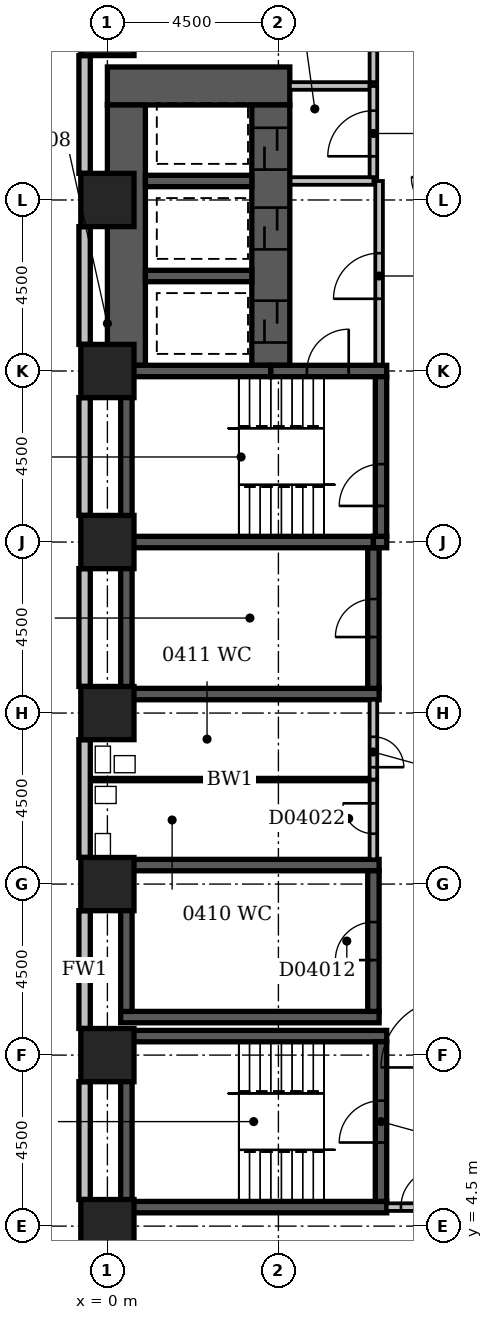
"""IFC4 building model, lengths in metres.
Left out: names, types, materials, properties, quantities, classifications, styles, units other than length and angle.
Written with IfcOpenShell. Run it as: python <this file> out.ifc"""

import sys

from ifc_helpers import new_model, si_unit, direction, frame, frame_2d, origin, origin_2d, place, context, subcontext, project, spatial, rectangle, extrude, element, fill, save


model = new_model("IFC4")
c1 = context("Model", 3, precision=1e-05, world=origin(), true_north=direction((0.0, 1.0)))
c2 = subcontext(c1, "Body", "Model", "MODEL_VIEW")
j1 = project(units=[si_unit("LENGTHUNIT", "METRE"), si_unit("PLANEANGLEUNIT", "RADIAN")], contexts=[c1])
p1 = place(None, origin())
s1 = spatial("IfcSite", under=j1, at=p1, CompositionType="ELEMENT")
p2 = place(p1, origin())
s2 = spatial("IfcBuilding", under=s1, at=p2, CompositionType="ELEMENT")
p3 = place(p2, frame((0.0, 0.0, 24.0)))
s3 = spatial("IfcBuildingStorey", under=s2, at=p3, CompositionType="ELEMENT", Elevation=24.0)
p4 = place(p3, frame((0.0, 34.5, -0.45), z_axis=(0.0, 0.0, 1.0), x_axis=(1.0, 0.0, 0.0)))
e1 = element("IfcWall", 1, at=p4, inside=s3, PredefinedType="SHEAR", context=c2, shape_type="SweptSolid", body=[
    extrude(rectangle(XDim=4.8, YDim=1.0, at=frame_2d((2.4, 0.0))), origin(), (0.0, 0.0, 1.0), 5.15),
])
for number, where, z_axis, x_axis in (
    (2, (0.35, 5.0, -0.45), (0.0, 0.0, 1.0), (1.0, 0.0, 0.0)),
    (3, (0.35, 9.5, -0.45), (0.0, 0.0, 1.0), (1.0, 0.0, 0.0)),
):
    element("IfcWall", number, at=place(p3, frame(where, z_axis=z_axis, x_axis=x_axis)), inside=s3, PredefinedType="SHEAR", context=c2, shape_type="SweptSolid", body=[
        extrude(rectangle(XDim=7.0, YDim=0.3, at=frame_2d((3.5, 0.0))), origin(), (0.0, 0.0, 1.0), 5.15),
    ])
for number, where, z_axis, x_axis in (
    (4, (0.35, 10.0, -0.45), (0.0, 0.0, 1.0), (1.0, 0.0, 0.0)),
    (5, (0.35, 14.0, -0.45), (0.0, 0.0, 1.0), (1.0, 0.0, 0.0)),
    (6, (0.35, 18.5, -0.45), (0.0, 0.0, 1.0), (1.0, 0.0, 0.0)),
):
    element("IfcWall", number, at=place(p3, frame(where, z_axis=z_axis, x_axis=x_axis)), inside=s3, PredefinedType="SHEAR", context=c2, shape_type="SweptSolid", body=[
        extrude(rectangle(XDim=6.8, YDim=0.3, at=frame_2d((3.4, 0.0))), origin(), (0.0, 0.0, 1.0), 5.15),
    ])
p5 = place(p3, frame((0.35, 22.5, -0.45), z_axis=(0.0, 0.0, 1.0), x_axis=(1.0, 0.0, 0.0)))
e7 = element("IfcWall", 7, at=p5, inside=s3, PredefinedType="SHEAR", context=c2, shape_type="SweptSolid", body=[
    extrude(rectangle(XDim=6.65, YDim=0.3, at=frame_2d((3.325, 0.0))), origin(), (0.0, 0.0, 1.0), 5.15),
])
p6 = place(p3, frame((0.35, 27.0, -0.45), z_axis=(0.0, 0.0, 1.0), x_axis=(1.0, 0.0, 0.0)))
e8 = element("IfcWall", 8, at=p6, inside=s3, PredefinedType="SHEAR", context=c2, shape_type="SweptSolid", body=[
    extrude(rectangle(XDim=3.95, YDim=0.3, at=frame_2d((1.975, 0.0))), origin(), (0.0, 0.0, 1.0), 5.15),
])
p7 = place(p3, frame((0.5, 5.15, -0.45), z_axis=(0.0, 0.0, 1.0), x_axis=(0.0, 1.0, 0.0)))
e9 = element("IfcWall", 9, at=p7, inside=s3, PredefinedType="SHEAR", context=c2, shape_type="SweptSolid", body=[
    extrude(rectangle(XDim=4.2, YDim=0.3, at=frame_2d((2.1, 0.0))), origin(), (0.0, 0.0, 1.0), 5.15),
])
for number, where, z_axis, x_axis in (
    (10, (0.5, 10.15, -0.45), (0.0, 0.0, 1.0), (0.0, 1.0, 0.0)),
    (11, (0.5, 18.65, -0.45), (0.0, 0.0, 1.0), (0.0, 1.0, 0.0)),
):
    element("IfcWall", number, at=place(p3, frame(where, z_axis=z_axis, x_axis=x_axis)), inside=s3, PredefinedType="SHEAR", context=c2, shape_type="SweptSolid", body=[
        extrude(rectangle(XDim=3.7, YDim=0.3, at=frame_2d((1.85, 0.0))), origin(), (0.0, 0.0, 1.0), 5.15),
    ])
p8 = place(p3, frame((0.5, 22.65, -0.45), z_axis=(0.0, 0.0, 1.0), x_axis=(0.0, 1.0, 0.0)))
e12 = element("IfcWall", 12, at=p8, inside=s3, PredefinedType="SHEAR", context=c2, shape_type="SweptSolid", body=[
    extrude(rectangle(XDim=4.2, YDim=0.3, at=frame_2d((2.1, 0.0))), origin(), (0.0, 0.0, 1.0), 5.15),
])
p9 = place(p3, frame((0.5, 27.15, -0.45), z_axis=(0.0, 0.0, 1.0), x_axis=(0.0, 1.0, 0.0)))
e13 = element("IfcWall", 13, at=p9, inside=s3, PredefinedType="SHEAR", context=c2, shape_type="SweptSolid", body=[
    extrude(rectangle(XDim=6.85, YDim=1.0, at=frame_2d((3.425, 0.0))), origin(), (0.0, 0.0, 1.0), 5.15),
])
for number, where, z_axis, x_axis in (
    (14, (1.0, 29.5, -0.45), (0.0, 0.0, 1.0), (1.0, 0.0, 0.0)),
    (15, (1.0, 32.0, -0.45), (0.0, 0.0, 1.0), (1.0, 0.0, 0.0)),
):
    element("IfcWall", number, at=place(p3, frame(where, z_axis=z_axis, x_axis=x_axis)), inside=s3, PredefinedType="SHEAR", context=c2, shape_type="SweptSolid", body=[
        extrude(rectangle(XDim=2.8, YDim=0.3, at=frame_2d((1.4, 0.0))), origin(), (0.0, 0.0, 1.0), 5.15),
    ])
p10 = place(p3, frame((4.3, 27.0, -0.45), z_axis=(0.0, 0.0, 1.0), x_axis=(1.0, 0.0, 0.0)))
e16 = element("IfcWall", 16, at=p10, inside=s3, PredefinedType="SHEAR", context=c2, shape_type="SweptSolid", body=[
    extrude(rectangle(XDim=3.05, YDim=0.3, at=frame_2d((1.525, 0.0))), origin(), (0.0, 0.0, 1.0), 5.15),
])
p11 = place(p10, frame((0.95, 0.0, 0.45)))
e17 = element("IfcOpeningElement", 17, at=p11, cuts=e16, PredefinedType="OPENING", context=c2, shape_type="SweptSolid", body=[
    extrude(rectangle(XDim=1.1, YDim=2.1, at=frame_2d((0.55, 1.05))), frame((0.0, 0.162, 0.0), z_axis=(0.0, -1.0, 0.0), x_axis=(1.0, 0.0, 0.0)), (0.0, 0.0, 1.0), 0.324),
])
p12 = place(p3, frame((4.3, 27.15, -0.45), z_axis=(0.0, 0.0, 1.0), x_axis=(0.0, 1.0, 0.0)))
e18 = element("IfcWall", 18, at=p12, inside=s3, PredefinedType="SHEAR", context=c2, shape_type="SweptSolid", body=[
    extrude(rectangle(XDim=6.85, YDim=1.0, at=frame_2d((3.425, 0.0))), origin(), (0.0, 0.0, 1.0), 5.15),
])
p13 = place(p12, frame((3.05, 0.0, 0.45)))
e19 = element("IfcOpeningElement", 19, at=p13, cuts=e18, PredefinedType="OPENING", context=c2, shape_type="SweptSolid", body=[
    extrude(rectangle(XDim=1.1, YDim=2.1, at=frame_2d((0.55, 1.05))), frame((0.0, 0.512, 0.0), z_axis=(0.0, -1.0, 0.0), x_axis=(1.0, 0.0, 0.0)), (0.0, 0.0, 1.0), 1.024),
])
p14 = place(p12, frame((0.6, 0.0, 0.45)))
e20 = element("IfcOpeningElement", 20, at=p14, cuts=e18, PredefinedType="OPENING", context=c2, shape_type="SweptSolid", body=[
    extrude(rectangle(XDim=1.1, YDim=2.1, at=frame_2d((0.55, 1.05))), frame((0.0, 0.512, 0.0), z_axis=(0.0, -1.0, 0.0), x_axis=(1.0, 0.0, 0.0)), (0.0, 0.0, 1.0), 1.024),
])
p15 = place(p12, frame((5.15, 0.0, 0.45)))
e21 = element("IfcOpeningElement", 21, at=p15, cuts=e18, PredefinedType="OPENING", context=c2, shape_type="SweptSolid", body=[
    extrude(rectangle(XDim=1.1, YDim=2.1, at=frame_2d((0.55, 1.05))), frame((0.0, 0.512, 0.0), z_axis=(0.0, -1.0, 0.0), x_axis=(1.0, 0.0, 0.0)), (0.0, 0.0, 1.0), 1.024),
])
p16 = place(p3, frame((7.0, 10.15, -0.45), z_axis=(0.0, 0.0, 1.0), x_axis=(0.0, 1.0, 0.0)))
e22 = element("IfcWall", 22, at=p16, inside=s3, PredefinedType="SHEAR", context=c2, shape_type="SweptSolid", body=[
    extrude(rectangle(XDim=3.7, YDim=0.3, at=frame_2d((1.85, 0.0))), origin(), (0.0, 0.0, 1.0), 5.15),
])
p17 = place(p16, frame((1.35, 0.0, 0.45)))
e23 = element("IfcOpeningElement", 23, at=p17, cuts=e22, PredefinedType="OPENING", context=c2, shape_type="SweptSolid", body=[
    extrude(rectangle(XDim=1.0, YDim=2.1, at=frame_2d((0.5, 1.05))), frame((0.0, 0.162, 0.0), z_axis=(0.0, -1.0, 0.0), x_axis=(1.0, 0.0, 0.0)), (0.0, 0.0, 1.0), 0.324),
])
p18 = place(p3, frame((7.0, 18.65, -0.45), z_axis=(0.0, 0.0, 1.0), x_axis=(0.0, 1.0, 0.0)))
e24 = element("IfcWall", 24, at=p18, inside=s3, PredefinedType="SHEAR", context=c2, shape_type="SweptSolid", body=[
    extrude(rectangle(XDim=3.7, YDim=0.3, at=frame_2d((1.85, 0.0))), origin(), (0.0, 0.0, 1.0), 5.15),
])
p19 = place(p18, frame((1.35, 0.0, 0.45)))
e25 = element("IfcOpeningElement", 25, at=p19, cuts=e24, PredefinedType="OPENING", context=c2, shape_type="SweptSolid", body=[
    extrude(rectangle(XDim=1.0, YDim=2.1, at=frame_2d((0.5, 1.05))), frame((0.0, 0.162, 0.0), z_axis=(0.0, -1.0, 0.0), x_axis=(1.0, 0.0, 0.0)), (0.0, 0.0, 1.0), 0.324),
])
p20 = place(p3, frame((7.0, 22.5, -0.45), z_axis=(0.0, 0.0, 1.0), x_axis=(1.0, 0.0, 0.0)))
e26 = element("IfcWall", 26, at=p20, inside=s3, PredefinedType="SHEAR", context=c2, shape_type="SweptSolid", body=[
    extrude(rectangle(XDim=0.35, YDim=0.3, at=frame_2d((0.175, 0.0))), origin(), (0.0, 0.0, 1.0), 5.15),
])
p21 = place(p3, frame((7.2, 5.15, -0.45), z_axis=(0.0, 0.0, 1.0), x_axis=(0.0, 1.0, 0.0)))
e27 = element("IfcWall", 27, at=p21, inside=s3, PredefinedType="SHEAR", context=c2, shape_type="SweptSolid", body=[
    extrude(rectangle(XDim=4.2, YDim=0.3, at=frame_2d((2.1, 0.0))), origin(), (0.0, 0.0, 1.0), 5.15),
])
p22 = place(p21, frame((1.55, 0.0, 0.45)))
e28 = element("IfcOpeningElement", 28, at=p22, cuts=e27, PredefinedType="OPENING", context=c2, shape_type="SweptSolid", body=[
    extrude(rectangle(XDim=1.1, YDim=2.1, at=frame_2d((0.55, 1.05))), frame((0.0, 0.162, 0.0), z_axis=(0.0, -1.0, 0.0), x_axis=(1.0, 0.0, 0.0)), (0.0, 0.0, 1.0), 0.324),
])
p23 = place(p3, frame((7.2, 22.65, -0.45), z_axis=(0.0, 0.0, 1.0), x_axis=(0.0, 1.0, 0.0)))
e29 = element("IfcWall", 29, at=p23, inside=s3, PredefinedType="SHEAR", context=c2, shape_type="SweptSolid", body=[
    extrude(rectangle(XDim=4.2, YDim=0.3, at=frame_2d((2.1, 0.0))), origin(), (0.0, 0.0, 1.0), 5.15),
])
p24 = place(p23, frame((0.8, 0.0, 0.45)))
e30 = element("IfcOpeningElement", 30, at=p24, cuts=e29, PredefinedType="OPENING", context=c2, shape_type="SweptSolid", body=[
    extrude(rectangle(XDim=1.1, YDim=2.1, at=frame_2d((0.55, 1.05))), frame((0.0, 0.162, 0.0), z_axis=(0.0, -1.0, 0.0), x_axis=(1.0, 0.0, 0.0)), (0.0, 0.0, 1.0), 0.324),
])
for number, where, z_axis, x_axis in (
    (31, (0.0, 4.5, -0.45), (0.0, 0.0, 1.0), (1.0, 0.0, 0.0)),
    (32, (0.0, 9.0, -0.45), (0.0, 0.0, 1.0), (1.0, 0.0, 0.0)),
    (33, (0.0, 13.5, -0.45), (0.0, 0.0, 1.0), (1.0, 0.0, 0.0)),
    (34, (0.0, 18.0, -0.45), (0.0, 0.0, 1.0), (1.0, 0.0, 0.0)),
    (35, (0.0, 22.5, -0.45), (0.0, 0.0, 1.0), (1.0, 0.0, 0.0)),
    (36, (0.0, 27.0, -0.45), (0.0, 0.0, 1.0), (1.0, 0.0, 0.0)),
    (37, (0.0, 31.5, -0.45), (0.0, 0.0, 1.0), (1.0, 0.0, 0.0)),
    (38, (0.0, 36.0, -0.45), (0.0, 0.0, 1.0), (1.0, 0.0, 0.0)),
):
    element("IfcColumn", number, at=place(p3, frame(where, z_axis=z_axis, x_axis=x_axis)), inside=s3, PredefinedType="COLUMN", context=c2, shape_type="SweptSolid", body=[
        extrude(rectangle(XDim=1.4, YDim=1.4, at=origin_2d()), origin(), (0.0, 0.0, 1.0), 5.15),
    ])
for number, where, z_axis, x_axis in (
    (39, (-0.6, 35.3, 0.0), (0.0, 0.0, 1.0), (0.0, -1.0, 0.0)),
    (40, (-0.6, 30.8, 0.0), (0.0, 0.0, 1.0), (0.0, -1.0, 0.0)),
    (41, (-0.6, 26.3, 0.0), (0.0, 0.0, 1.0), (0.0, -1.0, 0.0)),
    (42, (-0.6, 21.8, 0.0), (0.0, 0.0, 1.0), (0.0, -1.0, 0.0)),
    (43, (-0.6, 17.3, 0.0), (0.0, 0.0, 1.0), (0.0, -1.0, 0.0)),
    (44, (-0.6, 12.8, 0.0), (0.0, 0.0, 1.0), (0.0, -1.0, 0.0)),
    (45, (-0.6, 8.3, 0.0), (0.0, 0.0, 1.0), (0.0, -1.0, 0.0)),
):
    element("IfcWall", number, at=place(p3, frame(where, z_axis=z_axis, x_axis=x_axis)), inside=s3, PredefinedType="STANDARD", context=c2, shape_type="SweptSolid", body=[
        extrude(rectangle(XDim=3.1, YDim=0.3, at=frame_2d((1.55, 0.0))), origin(), (0.0, 0.0, 1.0), 4.1),
    ])
p25 = place(p3, frame((4.82, 32.0, 0.0), z_axis=(0.0, 0.0, 1.0), x_axis=(1.0, 0.0, 0.0)))
e46 = element("IfcWall", 46, at=p25, inside=s3, PredefinedType="PARTITIONING", context=c2, shape_type="SweptSolid", body=[
    extrude(rectangle(XDim=2.18, YDim=0.2, at=frame_2d((1.09, 0.0))), origin(), (0.0, 0.0, 1.0), 4.7),
])
p26 = place(p3, frame((7.0, 32.1, 0.0), z_axis=(0.0, 0.0, 1.0), x_axis=(0.0, 1.0, 0.0)))
e47 = element("IfcWall", 47, at=p26, inside=s3, PredefinedType="PARTITIONING", context=c2, shape_type="SweptSolid", body=[
    extrude(rectangle(XDim=2.4, YDim=0.2, at=frame_2d((1.2, 0.0))), origin(), (0.0, 0.0, 1.0), 4.7),
])
p27 = place(p26, frame((0.55, 0.0, 0.0)))
e48 = element("IfcOpeningElement", 48, at=p27, cuts=e47, PredefinedType="OPENING", context=c2, shape_type="SweptSolid", body=[
    extrude(rectangle(XDim=1.2, YDim=2.1, at=frame_2d((0.6, 1.05))), frame((0.0, 0.112, 0.0), z_axis=(0.0, -1.0, 0.0), x_axis=(1.0, 0.0, 0.0)), (0.0, 0.0, 1.0), 0.224),
])
p28 = place(p3, frame((4.8, 34.5, 0.0), z_axis=(0.0, 0.0, 1.0), x_axis=(1.0, 0.0, 0.0)))
e49 = element("IfcWall", 49, at=p28, inside=s3, PredefinedType="PARTITIONING", context=c2, shape_type="SweptSolid", body=[
    extrude(rectangle(XDim=2.1, YDim=0.2, at=frame_2d((1.05, 0.0))), origin(), (0.0, 0.0, 1.0), 4.7),
])
p29 = place(p3, frame((7.15, 27.17, 0.0), z_axis=(0.0, 0.0, 1.0), x_axis=(0.0, 1.0, 0.0)))
e50 = element("IfcWall", 50, at=p29, inside=s3, PredefinedType="PARTITIONING", context=c2, shape_type="SweptSolid", body=[
    extrude(rectangle(XDim=4.83, YDim=0.2, at=frame_2d((2.415, 0.0))), origin(), (0.0, 0.0, 1.0), 4.7),
])
p30 = place(p29, frame((1.73, 0.0, 0.0)))
e51 = element("IfcOpeningElement", 51, at=p30, cuts=e50, PredefinedType="OPENING", context=c2, shape_type="SweptSolid", body=[
    extrude(rectangle(XDim=1.2, YDim=2.1, at=frame_2d((0.6, 1.05))), frame((0.0, 0.112, 0.0), z_axis=(0.0, -1.0, 0.0), x_axis=(1.0, 0.0, 0.0)), (0.0, 0.0, 1.0), 0.224),
])
p31 = place(p3, frame((7.35, 5.0, 0.0), z_axis=(0.0, 0.0, 1.0), x_axis=(1.0, 0.0, 0.0)))
e52 = element("IfcWall", 52, at=p31, inside=s3, PredefinedType="PARTITIONING", context=c2, shape_type="SweptSolid", body=[
    extrude(rectangle(XDim=1.75, YDim=0.2, at=frame_2d((0.875, 0.0))), origin(), (0.0, 0.0, 1.0), 4.7),
])
p32 = place(p31, frame((0.375, 0.0, 0.0)))
e53 = element("IfcOpeningElement", 53, at=p32, cuts=e52, PredefinedType="OPENING", context=c2, shape_type="SweptSolid", body=[
    extrude(rectangle(XDim=1.0, YDim=2.1, at=frame_2d((0.5, 1.05))), frame((0.0, 0.112, 0.0), z_axis=(0.0, -1.0, 0.0), x_axis=(1.0, 0.0, 0.0)), (0.0, 0.0, 1.0), 0.224),
])
p33 = place(p3, frame((-0.45, 16.25, 0.0), z_axis=(0.0, 0.0, 1.0), x_axis=(1.0, 0.0, 0.0)))
e54 = element("IfcWall", 54, at=p33, inside=s3, PredefinedType="PLUMBINGWALL", context=c2, shape_type="SweptSolid", body=[
    extrude(rectangle(XDim=7.35, YDim=0.1, at=frame_2d((3.675, 0.0))), origin(), (0.0, 0.0, 1.0), 4.7),
])
p34 = place(p3, frame((7.0, 16.25, 0.0), z_axis=(0.0, 0.0, 1.0), x_axis=(0.0, -1.0, 0.0)))
e55 = element("IfcWall", 55, at=p34, inside=s3, PredefinedType="PARTITIONING", context=c2, shape_type="SweptSolid", body=[
    extrude(rectangle(XDim=2.1, YDim=0.2, at=frame_2d((1.05, 0.0))), origin(), (0.0, 0.0, 1.0), 4.7),
])
p35 = place(p34, frame((0.625, 0.0, 0.0)))
e56 = element("IfcOpeningElement", 56, at=p35, cuts=e55, PredefinedType="OPENING", context=c2, shape_type="SweptSolid", body=[
    extrude(rectangle(XDim=0.8, YDim=2.1, at=frame_2d((0.4, 1.05))), frame((0.0, 0.112, 0.0), z_axis=(0.0, -1.0, 0.0), x_axis=(1.0, 0.0, 0.0)), (0.0, 0.0, 1.0), 0.224),
])
p36 = place(p3, frame((7.0, 18.35, 0.0), z_axis=(0.0, 0.0, 1.0), x_axis=(0.0, -1.0, 0.0)))
e57 = element("IfcWall", 57, at=p36, inside=s3, PredefinedType="PARTITIONING", context=c2, shape_type="SweptSolid", body=[
    extrude(rectangle(XDim=2.1, YDim=0.2, at=frame_2d((1.05, 0.0))), origin(), (0.0, 0.0, 1.0), 4.7),
])
p37 = place(p36, frame((0.975, 0.0, 0.0)))
e58 = element("IfcOpeningElement", 58, at=p37, cuts=e57, PredefinedType="OPENING", context=c2, shape_type="SweptSolid", body=[
    extrude(rectangle(XDim=0.8, YDim=2.1, at=frame_2d((0.4, 1.05))), frame((0.0, 0.112, 0.0), z_axis=(0.0, -1.0, 0.0), x_axis=(1.0, 0.0, 0.0)), (0.0, 0.0, 1.0), 0.224),
])
p38 = place(p3, frame((7.0, 37.0, 0.0), z_axis=(0.0, 0.0, 1.0), x_axis=(0.0, -1.0, 0.0)))
e59 = element("IfcWall", 59, at=p38, inside=s3, PredefinedType="PARTITIONING", context=c2, shape_type="SweptSolid", body=[
    extrude(rectangle(XDim=2.4, YDim=0.2, at=frame_2d((1.2, 0.0))), origin(), (0.0, 0.0, 1.0), 4.7),
])
p39 = place(p38, frame((0.775, 0.0, 0.0)))
e60 = element("IfcOpeningElement", 60, at=p39, cuts=e59, PredefinedType="OPENING", context=c2, shape_type="SweptSolid", body=[
    extrude(rectangle(XDim=0.8, YDim=2.1, at=frame_2d((0.4, 1.05))), frame((0.0, 0.112, 0.0), z_axis=(0.0, -1.0, 0.0), x_axis=(1.0, 0.0, 0.0)), (0.0, 0.0, 1.0), 0.224),
])
p40 = place(p30, origin())
e61 = element("IfcDoor", 61, at=p40, inside=s3, OperationType="SINGLE_SWING_LEFT", PredefinedType="DOOR", context=c2, shape_type="SweptSolid", body=[
    extrude(rectangle(XDim=1.2, YDim=2.1, at=frame_2d((0.6, 1.05))), frame((0.0, 0.025, 0.0), z_axis=(0.0, -1.0, 0.0), x_axis=(1.0, 0.0, 0.0)), (0.0, 0.0, 1.0), 0.05),
])
fill(e51, e61)
p41 = place(p13, origin())
e62 = element("IfcDoor", 62, at=p41, inside=s3, OperationType="SLIDING_TO_LEFT", PredefinedType="DOOR", context=c2, shape_type="SweptSolid", body=[
    extrude(rectangle(XDim=1.1, YDim=2.1, at=frame_2d((0.55, 1.05))), frame((0.0, 0.025, 0.0), z_axis=(0.0, -1.0, 0.0), x_axis=(1.0, 0.0, 0.0)), (0.0, 0.0, 1.0), 0.05),
])
fill(e19, e62)
p42 = place(p14, origin())
e63 = element("IfcDoor", 63, at=p42, inside=s3, OperationType="SLIDING_TO_LEFT", PredefinedType="DOOR", context=c2, shape_type="SweptSolid", body=[
    extrude(rectangle(XDim=1.1, YDim=2.1, at=frame_2d((0.55, 1.05))), frame((0.0, 0.025, 0.0), z_axis=(0.0, -1.0, 0.0), x_axis=(1.0, 0.0, 0.0)), (0.0, 0.0, 1.0), 0.05),
])
fill(e20, e63)
p43 = place(p27, origin())
e64 = element("IfcDoor", 64, at=p43, inside=s3, OperationType="SINGLE_SWING_LEFT", PredefinedType="DOOR", context=c2, shape_type="SweptSolid", body=[
    extrude(rectangle(XDim=1.2, YDim=2.1, at=frame_2d((0.6, 1.05))), frame((0.0, 0.025, 0.0), z_axis=(0.0, -1.0, 0.0), x_axis=(1.0, 0.0, 0.0)), (0.0, 0.0, 1.0), 0.05),
])
fill(e48, e64)
p44 = place(p15, origin())
e65 = element("IfcDoor", 65, at=p44, inside=s3, OperationType="SLIDING_TO_LEFT", PredefinedType="DOOR", context=c2, shape_type="SweptSolid", body=[
    extrude(rectangle(XDim=1.1, YDim=2.1, at=frame_2d((0.55, 1.05))), frame((0.0, 0.025, 0.0), z_axis=(0.0, -1.0, 0.0), x_axis=(1.0, 0.0, 0.0)), (0.0, 0.0, 1.0), 0.05),
])
fill(e21, e65)
p45 = place(p19, origin())
e66 = element("IfcDoor", 66, at=p45, inside=s3, OperationType="SINGLE_SWING_LEFT", PredefinedType="DOOR", context=c2, shape_type="SweptSolid", body=[
    extrude(rectangle(XDim=1.0, YDim=2.1, at=frame_2d((0.5, 1.05))), frame((0.0, 0.025, 0.0), z_axis=(0.0, -1.0, 0.0), x_axis=(1.0, 0.0, 0.0)), (0.0, 0.0, 1.0), 0.05),
])
fill(e25, e66)
p46 = place(p17, origin())
e67 = element("IfcDoor", 67, at=p46, inside=s3, OperationType="SINGLE_SWING_LEFT", PredefinedType="DOOR", context=c2, shape_type="SweptSolid", body=[
    extrude(rectangle(XDim=1.0, YDim=2.1, at=frame_2d((0.5, 1.05))), frame((0.0, 0.025, 0.0), z_axis=(0.0, -1.0, 0.0), x_axis=(1.0, 0.0, 0.0)), (0.0, 0.0, 1.0), 0.05),
])
fill(e23, e67)
p47 = place(p11, frame((1.1, 0.0, 0.0), z_axis=(0.0, 0.0, 1.0), x_axis=(-1.0, 0.0, 0.0)))
e68 = element("IfcDoor", 68, at=p47, inside=s3, OperationType="SINGLE_SWING_LEFT", PredefinedType="DOOR", context=c2, shape_type="SweptSolid", body=[
    extrude(rectangle(XDim=1.1, YDim=2.1, at=frame_2d((0.55, 1.05))), frame((0.0, 0.025, 0.0), z_axis=(0.0, -1.0, 0.0), x_axis=(1.0, 0.0, 0.0)), (0.0, 0.0, 1.0), 0.05),
])
fill(e17, e68)
p48 = place(p24, origin())
e69 = element("IfcDoor", 69, at=p48, inside=s3, OperationType="SINGLE_SWING_LEFT", PredefinedType="DOOR", context=c2, shape_type="SweptSolid", body=[
    extrude(rectangle(XDim=1.1, YDim=2.1, at=frame_2d((0.55, 1.05))), frame((0.0, 0.025, 0.0), z_axis=(0.0, -1.0, 0.0), x_axis=(1.0, 0.0, 0.0)), (0.0, 0.0, 1.0), 0.05),
])
fill(e30, e69)
p49 = place(p22, origin())
e70 = element("IfcDoor", 70, at=p49, inside=s3, OperationType="SINGLE_SWING_LEFT", PredefinedType="DOOR", context=c2, shape_type="SweptSolid", body=[
    extrude(rectangle(XDim=1.1, YDim=2.1, at=frame_2d((0.55, 1.05))), frame((0.0, 0.025, 0.0), z_axis=(0.0, -1.0, 0.0), x_axis=(1.0, 0.0, 0.0)), (0.0, 0.0, 1.0), 0.05),
])
fill(e28, e70)
p50 = place(p32, frame((1.0, 0.0, 0.0), z_axis=(0.0, 0.0, 1.0), x_axis=(-1.0, 0.0, 0.0)))
e71 = element("IfcDoor", 71, at=p50, inside=s3, OperationType="SINGLE_SWING_LEFT", PredefinedType="DOOR", context=c2, shape_type="SweptSolid", body=[
    extrude(rectangle(XDim=1.0, YDim=2.1, at=frame_2d((0.5, 1.05))), frame((0.0, 0.025, 0.0), z_axis=(0.0, -1.0, 0.0), x_axis=(1.0, 0.0, 0.0)), (0.0, 0.0, 1.0), 0.05),
])
fill(e53, e71)
p51 = place(p35, frame((0.8, 0.0, 0.0), z_axis=(0.0, 0.0, 1.0), x_axis=(-1.0, 0.0, 0.0)))
e72 = element("IfcDoor", 72, at=p51, inside=s3, OperationType="SINGLE_SWING_RIGHT", PredefinedType="DOOR", context=c2, shape_type="SweptSolid", body=[
    extrude(rectangle(XDim=0.8, YDim=2.1, at=frame_2d((0.4, 1.05))), frame((0.0, 0.025, 0.0), z_axis=(0.0, -1.0, 0.0), x_axis=(1.0, 0.0, 0.0)), (0.0, 0.0, 1.0), 0.05),
])
fill(e56, e72)
p52 = place(p37, frame((0.8, 0.0, 0.0), z_axis=(0.0, 0.0, 1.0), x_axis=(-1.0, 0.0, 0.0)))
e73 = element("IfcDoor", 73, at=p52, inside=s3, OperationType="SINGLE_SWING_LEFT", PredefinedType="DOOR", context=c2, shape_type="SweptSolid", body=[
    extrude(rectangle(XDim=0.8, YDim=2.1, at=frame_2d((0.4, 1.05))), frame((0.0, 0.025, 0.0), z_axis=(0.0, -1.0, 0.0), x_axis=(1.0, 0.0, 0.0)), (0.0, 0.0, 1.0), 0.05),
])
fill(e58, e73)
save(model, sys.argv[1])
